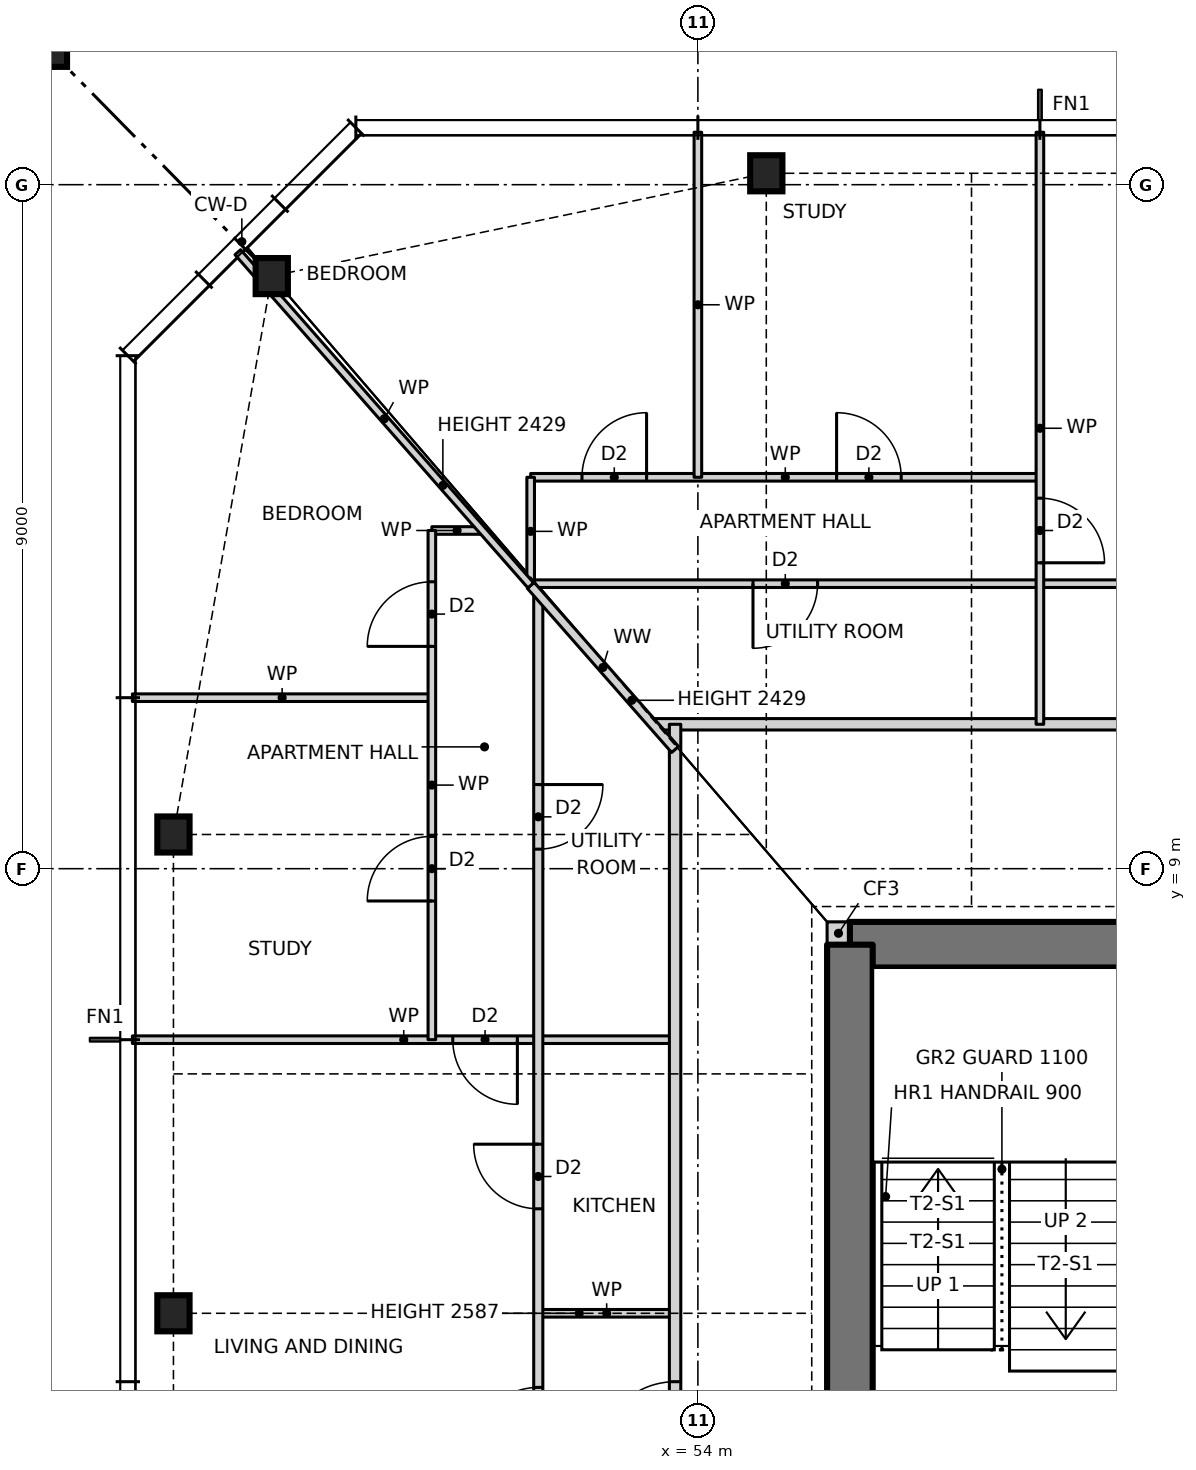
"""IFC4 building model, lengths in metres.
Left out: names, types, materials, properties, quantities, classifications, styles, units other than length and angle.
Written with IfcOpenShell. Run it as: python <this file> out.ifc"""

import sys

from ifc_helpers import new_model, si_unit, direction, frame, frame_2d, origin, origin_2d, place, context, subcontext, project, spatial, rectangle, hollow_rectangle, i_section, extrude, element, fill, save


model = new_model("IFC4")
c1 = context("Model", 3, precision=1e-05, world=origin(), true_north=direction((0.0, 1.0)))
c2 = subcontext(c1, "Body", "Model", "MODEL_VIEW")
j1 = project(units=[si_unit("LENGTHUNIT", "METRE"), si_unit("PLANEANGLEUNIT", "RADIAN")], contexts=[c1])
p1 = place(None, origin())
s1 = spatial("IfcSite", under=j1, at=p1, CompositionType="ELEMENT")
p2 = place(p1, origin())
s2 = spatial("IfcBuilding", under=s1, at=p2, CompositionType="ELEMENT")
p3 = place(p2, frame((0.0, 0.0, 43.0)))
s3 = spatial("IfcBuildingStorey", under=s2, at=p3, CompositionType="ELEMENT", Elevation=43.0)
for number, where, z_axis, x_axis in (
    (1, (54.9, 18.15, 0.0), (0.0, 0.0, 1.0), (1.0, 0.0, 0.0)),
    (2, (48.394, 16.797, 0.0), (0.0, 0.0, 1.0), (1.0, 0.0, 0.0)),
    (3, (47.1, 9.45, 0.0), (0.0, 0.0, 1.0), (1.0, 0.0, 0.0)),
    (4, (47.1, 3.15, 0.0), (0.0, 0.0, 1.0), (1.0, 0.0, 0.0)),
):
    element("IfcColumn", number, at=place(p3, frame(where, z_axis=z_axis, x_axis=x_axis)), inside=s3, PredefinedType="COLUMN", context=c2, shape_type="SweptSolid", body=[
        extrude(i_section(OverallWidth=0.424, OverallDepth=0.475, WebThickness=0.048, FlangeThickness=0.077, at=origin_2d()), origin(), (0.0, 0.0, 1.0), 3.5),
    ])
p4 = place(p3, frame((45.1, 20.15, 0.0), z_axis=(0.0, 0.0, 1.0), x_axis=(1.0, 0.0, 0.0)))
e5 = element("IfcColumn", 5, at=p4, inside=s3, PredefinedType="COLUMN", context=c2, shape_type="SweptSolid", body=[
    extrude(hollow_rectangle(XDim=1.2, YDim=1.2, WallThickness=0.07, at=origin_2d()), origin(), (0.0, 0.0, 1.0), 3.5),
])
p5 = place(p3, frame((55.7, 8.15, 0.0), z_axis=(0.0, 0.0, 1.0), x_axis=(1.0, 0.0, 0.0)))
e6 = element("IfcWall", 6, at=p5, inside=s3, PredefinedType="SOLIDWALL", context=c2, shape_type="SweptSolid", body=[
    extrude(rectangle(XDim=0.3, YDim=0.3, at=frame_2d((0.15, 0.0))), origin(), (0.0, 0.0, 1.0), 3.5),
])
p6 = place(p3, frame((70.0, 8.0, 0.0), z_axis=(0.0, 0.0, 1.0), x_axis=(-1.0, 0.0, 0.0)))
e7 = element("IfcWall", 7, at=p6, inside=s3, PredefinedType="SHEAR", context=c2, shape_type="SweptSolid", body=[
    extrude(rectangle(XDim=14.0, YDim=0.6, at=frame_2d((7.0, 0.0))), origin(), (0.0, 0.0, 1.0), 3.5),
])
p7 = place(p6, frame((8.2, 0.0, 0.0)))
e8 = element("IfcOpeningElement", 8, at=p7, cuts=e7, PredefinedType="OPENING", context=c2, shape_type="SweptSolid", body=[
    extrude(rectangle(XDim=0.9, YDim=2.1, at=frame_2d((0.45, 1.05))), frame((0.0, 0.31, 0.0), z_axis=(0.0, -1.0, 0.0), x_axis=(1.0, 0.0, 0.0)), (0.0, 0.0, 1.0), 0.62),
])
p8 = place(p6, frame((3.2, 0.0, 0.0)))
e9 = element("IfcOpeningElement", 9, at=p8, cuts=e7, PredefinedType="OPENING", context=c2, shape_type="SweptSolid", body=[
    extrude(rectangle(XDim=0.9, YDim=2.1, at=frame_2d((0.45, 1.05))), frame((0.0, 0.31, 0.0), z_axis=(0.0, -1.0, 0.0), x_axis=(1.0, 0.0, 0.0)), (0.0, 0.0, 1.0), 0.62),
])
p9 = place(p3, frame((56.0, 8.0, 0.0), z_axis=(0.0, 0.0, 1.0), x_axis=(0.0, -1.0, 0.0)))
e10 = element("IfcWall", 10, at=p9, inside=s3, PredefinedType="SHEAR", context=c2, shape_type="SweptSolid", body=[
    extrude(rectangle(XDim=16.0, YDim=0.6, at=frame_2d((8.0, 0.0))), origin(), (0.0, 0.0, 1.0), 3.5),
])
p10 = place(p9, frame((7.5, 0.0, 0.0)))
e11 = element("IfcOpeningElement", 11, at=p10, cuts=e10, PredefinedType="OPENING", context=c2, shape_type="SweptSolid", body=[
    extrude(rectangle(XDim=1.0, YDim=2.1, at=frame_2d((0.5, 1.05))), frame((0.0, 0.31, 0.0), z_axis=(0.0, -1.0, 0.0), x_axis=(1.0, 0.0, 0.0)), (0.0, 0.0, 1.0), 0.62),
])
p11 = place(p3, frame((51.9, 3.15, 0.0), z_axis=(0.0, 0.0, 1.0), x_axis=(1.0, 0.0, 0.0)))
e12 = element("IfcWall", 12, at=p11, inside=s3, PredefinedType="PARTITIONING", context=c2, shape_type="SweptSolid", body=[
    extrude(rectangle(XDim=1.8, YDim=0.1, at=frame_2d((0.9, 0.0))), origin(), (0.0, 0.0, 1.0), 2.587),
])
p12 = place(p3, frame((46.56, 6.75, 0.0), z_axis=(0.0, 0.0, 1.0), x_axis=(1.0, 0.0, 0.0)))
e13 = element("IfcWall", 13, at=p12, inside=s3, PredefinedType="PARTITIONING", context=c2, shape_type="SweptSolid", body=[
    extrude(rectangle(XDim=7.14, YDim=0.1, at=frame_2d((3.57, 0.0))), origin(), (0.0, 0.0, 1.0), 3.27),
])
p13 = place(p12, frame((4.215, 0.0, 0.0)))
e14 = element("IfcOpeningElement", 14, at=p13, cuts=e13, PredefinedType="OPENING", context=c2, shape_type="SweptSolid", body=[
    extrude(rectangle(XDim=0.85, YDim=2.1, at=frame_2d((0.425, 1.05))), frame((0.0, 0.06, 0.0), z_axis=(0.0, -1.0, 0.0), x_axis=(1.0, 0.0, 0.0)), (0.0, 0.0, 1.0), 0.12),
])
p14 = place(p3, frame((53.408, 10.9, 0.0), z_axis=(0.0, 0.0, 1.0), x_axis=(1.0, 0.0, 0.0)))
e15 = element("IfcWall", 15, at=p14, inside=s3, PredefinedType="PARTITIONING", context=c2, shape_type="SweptSolid", body=[
    extrude(rectangle(XDim=19.184, YDim=0.15, at=frame_2d((9.592, 0.0))), origin(), (0.0, 0.0, 1.0), 3.27),
])
p15 = place(p14, frame((8.592, 0.0, 0.0)))
e16 = element("IfcOpeningElement", 16, at=p15, cuts=e15, PredefinedType="OPENING", context=c2, shape_type="SweptSolid", body=[
    extrude(rectangle(XDim=1.0, YDim=2.1, at=frame_2d((0.5, 1.05))), frame((0.0, 0.085, 0.0), z_axis=(0.0, -1.0, 0.0), x_axis=(1.0, 0.0, 0.0)), (0.0, 0.0, 1.0), 0.17),
])
p16 = place(p3, frame((46.56, 11.25, 0.0), z_axis=(0.0, 0.0, 1.0), x_axis=(1.0, 0.0, 0.0)))
e17 = element("IfcWall", 17, at=p16, inside=s3, PredefinedType="PARTITIONING", context=c2, shape_type="SweptSolid", body=[
    extrude(rectangle(XDim=3.94, YDim=0.1, at=frame_2d((1.97, 0.0))), origin(), (0.0, 0.0, 1.0), 3.27),
])
p17 = place(p3, frame((51.8, 12.75, 0.0), z_axis=(0.0, 0.0, 1.0), x_axis=(1.0, 0.0, 0.0)))
e18 = element("IfcWall", 18, at=p17, inside=s3, PredefinedType="PARTITIONING", context=c2, shape_type="SweptSolid", body=[
    extrude(rectangle(XDim=22.4, YDim=0.1, at=frame_2d((11.2, 0.0))), origin(), (0.0, 0.0, 1.0), 3.27),
])
p18 = place(p17, frame((13.475, 0.0, 0.0)))
e19 = element("IfcOpeningElement", 19, at=p18, cuts=e18, PredefinedType="OPENING", context=c2, shape_type="SweptSolid", body=[
    extrude(rectangle(XDim=0.85, YDim=2.1, at=frame_2d((0.425, 1.05))), frame((0.0, 0.06, 0.0), z_axis=(0.0, -1.0, 0.0), x_axis=(1.0, 0.0, 0.0)), (0.0, 0.0, 1.0), 0.12),
])
p19 = place(p17, frame((10.275, 0.0, 0.0)))
e20 = element("IfcOpeningElement", 20, at=p19, cuts=e18, PredefinedType="OPENING", context=c2, shape_type="SweptSolid", body=[
    extrude(rectangle(XDim=0.85, YDim=2.1, at=frame_2d((0.425, 1.05))), frame((0.0, 0.06, 0.0), z_axis=(0.0, -1.0, 0.0), x_axis=(1.0, 0.0, 0.0)), (0.0, 0.0, 1.0), 0.12),
])
p20 = place(p17, frame((18.625, 0.0, 0.0)))
e21 = element("IfcOpeningElement", 21, at=p20, cuts=e18, PredefinedType="OPENING", context=c2, shape_type="SweptSolid", body=[
    extrude(rectangle(XDim=0.85, YDim=2.1, at=frame_2d((0.425, 1.05))), frame((0.0, 0.06, 0.0), z_axis=(0.0, -1.0, 0.0), x_axis=(1.0, 0.0, 0.0)), (0.0, 0.0, 1.0), 0.12),
])
p21 = place(p17, frame((2.925, 0.0, 0.0)))
e22 = element("IfcOpeningElement", 22, at=p21, cuts=e18, PredefinedType="OPENING", context=c2, shape_type="SweptSolid", body=[
    extrude(rectangle(XDim=0.85, YDim=2.1, at=frame_2d((0.425, 1.05))), frame((0.0, 0.06, 0.0), z_axis=(0.0, -1.0, 0.0), x_axis=(1.0, 0.0, 0.0)), (0.0, 0.0, 1.0), 0.12),
])
p22 = place(p3, frame((50.5, 13.45, 0.0), z_axis=(0.0, 0.0, 1.0), x_axis=(1.0, 0.0, 0.0)))
e23 = element("IfcWall", 23, at=p22, inside=s3, PredefinedType="PARTITIONING", context=c2, shape_type="SweptSolid", body=[
    extrude(rectangle(XDim=0.664, YDim=0.1, at=frame_2d((0.332, 0.0))), origin(), (0.0, 0.0, 1.0), 3.27),
])
p23 = place(p3, frame((51.8, 14.15, 0.0), z_axis=(0.0, 0.0, 1.0), x_axis=(1.0, 0.0, 0.0)))
e24 = element("IfcWall", 24, at=p23, inside=s3, PredefinedType="PARTITIONING", context=c2, shape_type="SweptSolid", body=[
    extrude(rectangle(XDim=6.7, YDim=0.1, at=frame_2d((3.35, 0.0))), origin(), (0.0, 0.0, 1.0), 3.27),
])
p24 = place(p23, frame((4.025, 0.0, 0.0)))
e25 = element("IfcOpeningElement", 25, at=p24, cuts=e24, PredefinedType="OPENING", context=c2, shape_type="SweptSolid", body=[
    extrude(rectangle(XDim=0.85, YDim=2.1, at=frame_2d((0.425, 1.05))), frame((0.0, 0.06, 0.0), z_axis=(0.0, -1.0, 0.0), x_axis=(1.0, 0.0, 0.0)), (0.0, 0.0, 1.0), 0.12),
])
p25 = place(p23, frame((0.675, 0.0, 0.0)))
e26 = element("IfcOpeningElement", 26, at=p25, cuts=e24, PredefinedType="OPENING", context=c2, shape_type="SweptSolid", body=[
    extrude(rectangle(XDim=0.85, YDim=2.1, at=frame_2d((0.425, 1.05))), frame((0.0, 0.06, 0.0), z_axis=(0.0, -1.0, 0.0), x_axis=(1.0, 0.0, 0.0)), (0.0, 0.0, 1.0), 0.12),
])
p26 = place(p3, frame((58.5, 10.9, 0.0), z_axis=(0.0, 0.0, 1.0), x_axis=(0.0, 1.0, 0.0)))
e27 = element("IfcWall", 27, at=p26, inside=s3, PredefinedType="PARTITIONING", context=c2, shape_type="SweptSolid", body=[
    extrude(rectangle(XDim=7.79, YDim=0.1, at=frame_2d((3.895, 0.0))), origin(), (0.0, 0.0, 1.0), 3.27),
])
p27 = place(p26, frame((2.125, 0.0, 0.0)))
e28 = element("IfcOpeningElement", 28, at=p27, cuts=e27, PredefinedType="OPENING", context=c2, shape_type="SweptSolid", body=[
    extrude(rectangle(XDim=0.85, YDim=2.1, at=frame_2d((0.425, 1.05))), frame((0.0, 0.06, 0.0), z_axis=(0.0, -1.0, 0.0), x_axis=(1.0, 0.0, 0.0)), (0.0, 0.0, 1.0), 0.12),
])
p28 = place(p3, frame((54.0, 14.15, 0.0), z_axis=(0.0, 0.0, 1.0), x_axis=(0.0, 1.0, 0.0)))
e29 = element("IfcWall", 29, at=p28, inside=s3, PredefinedType="PARTITIONING", context=c2, shape_type="SweptSolid", body=[
    extrude(rectangle(XDim=4.54, YDim=0.1, at=frame_2d((2.27, 0.0))), origin(), (0.0, 0.0, 1.0), 3.27),
])
p29 = place(p3, frame((53.7, -10.568, 0.0), z_axis=(0.0, 0.0, 1.0), x_axis=(0.0, 1.0, 0.0)))
e30 = element("IfcWall", 30, at=p29, inside=s3, PredefinedType="PARTITIONING", context=c2, shape_type="SweptSolid", body=[
    extrude(rectangle(XDim=21.468, YDim=0.15, at=frame_2d((10.734, 0.0))), origin(), (0.0, 0.0, 1.0), 3.27),
])
p30 = place(p29, frame((11.818, 0.0, 0.0)))
e31 = element("IfcOpeningElement", 31, at=p30, cuts=e30, PredefinedType="OPENING", context=c2, shape_type="SweptSolid", body=[
    extrude(rectangle(XDim=1.0, YDim=2.1, at=frame_2d((0.5, 1.05))), frame((0.0, 0.085, 0.0), z_axis=(0.0, -1.0, 0.0), x_axis=(1.0, 0.0, 0.0)), (0.0, 0.0, 1.0), 0.17),
])
p31 = place(p3, frame((51.9, -12.614, 0.0), z_axis=(0.0, 0.0, 1.0), x_axis=(0.0, 1.0, 0.0)))
e32 = element("IfcWall", 32, at=p31, inside=s3, PredefinedType="PARTITIONING", context=c2, shape_type="SweptSolid", body=[
    extrude(rectangle(XDim=25.228, YDim=0.12, at=frame_2d((12.614, 0.0))), origin(), (0.0, 0.0, 1.0), 3.27),
])
p32 = place(p31, frame((17.139, 0.0, 0.0)))
e33 = element("IfcOpeningElement", 33, at=p32, cuts=e32, PredefinedType="OPENING", context=c2, shape_type="SweptSolid", body=[
    extrude(rectangle(XDim=0.85, YDim=2.1, at=frame_2d((0.425, 1.05))), frame((0.0, 0.07, 0.0), z_axis=(0.0, -1.0, 0.0), x_axis=(1.0, 0.0, 0.0)), (0.0, 0.0, 1.0), 0.14),
])
p33 = place(p31, frame((13.939, 0.0, 0.0)))
e34 = element("IfcOpeningElement", 34, at=p33, cuts=e32, PredefinedType="OPENING", context=c2, shape_type="SweptSolid", body=[
    extrude(rectangle(XDim=0.85, YDim=2.1, at=frame_2d((0.425, 1.05))), frame((0.0, 0.07, 0.0), z_axis=(0.0, -1.0, 0.0), x_axis=(1.0, 0.0, 0.0)), (0.0, 0.0, 1.0), 0.14),
])
p34 = place(p31, frame((21.871, 0.0, 0.0)))
e35 = element("IfcOpeningElement", 35, at=p34, cuts=e32, PredefinedType="OPENING", context=c2, shape_type="SweptSolid", body=[
    extrude(rectangle(XDim=0.85, YDim=2.1, at=frame_2d((0.425, 1.05))), frame((0.0, 0.07, 0.0), z_axis=(0.0, -1.0, 0.0), x_axis=(1.0, 0.0, 0.0)), (0.0, 0.0, 1.0), 0.14),
])
p35 = place(p31, frame((7.739, 0.0, 0.0)))
e36 = element("IfcOpeningElement", 36, at=p35, cuts=e32, PredefinedType="OPENING", context=c2, shape_type="SweptSolid", body=[
    extrude(rectangle(XDim=0.85, YDim=2.1, at=frame_2d((0.425, 1.05))), frame((0.0, 0.07, 0.0), z_axis=(0.0, -1.0, 0.0), x_axis=(1.0, 0.0, 0.0)), (0.0, 0.0, 1.0), 0.14),
])
p36 = place(p31, frame((2.557, 0.0, 0.0)))
e37 = element("IfcOpeningElement", 37, at=p36, cuts=e32, PredefinedType="OPENING", context=c2, shape_type="SweptSolid", body=[
    extrude(rectangle(XDim=0.85, YDim=2.1, at=frame_2d((0.425, 1.05))), frame((0.0, 0.07, 0.0), z_axis=(0.0, -1.0, 0.0), x_axis=(1.0, 0.0, 0.0)), (0.0, 0.0, 1.0), 0.14),
])
p37 = place(p3, frame((51.8, 12.727, 0.0), z_axis=(0.0, 0.0, 1.0), x_axis=(0.0, 1.0, 0.0)))
e38 = element("IfcWall", 38, at=p37, inside=s3, PredefinedType="PARTITIONING", context=c2, shape_type="SweptSolid", body=[
    extrude(rectangle(XDim=1.423, YDim=0.1, at=frame_2d((0.711, 0.0))), origin(), (0.0, 0.0, 1.0), 3.27),
])
p38 = place(p3, frame((50.5, 6.75, 0.0), z_axis=(0.0, 0.0, 1.0), x_axis=(0.0, 1.0, 0.0)))
e39 = element("IfcWall", 39, at=p38, inside=s3, PredefinedType="PARTITIONING", context=c2, shape_type="SweptSolid", body=[
    extrude(rectangle(XDim=6.7, YDim=0.1, at=frame_2d((3.35, 0.0))), origin(), (0.0, 0.0, 1.0), 3.27),
])
p39 = place(p38, frame((1.825, 0.0, 0.0)))
e40 = element("IfcOpeningElement", 40, at=p39, cuts=e39, PredefinedType="OPENING", context=c2, shape_type="SweptSolid", body=[
    extrude(rectangle(XDim=0.85, YDim=2.1, at=frame_2d((0.425, 1.05))), frame((0.0, 0.06, 0.0), z_axis=(0.0, -1.0, 0.0), x_axis=(1.0, 0.0, 0.0)), (0.0, 0.0, 1.0), 0.12),
])
p40 = place(p38, frame((5.175, 0.0, 0.0)))
e41 = element("IfcOpeningElement", 41, at=p40, cuts=e39, PredefinedType="OPENING", context=c2, shape_type="SweptSolid", body=[
    extrude(rectangle(XDim=0.85, YDim=2.1, at=frame_2d((0.425, 1.05))), frame((0.0, 0.06, 0.0), z_axis=(0.0, -1.0, 0.0), x_axis=(1.0, 0.0, 0.0)), (0.0, 0.0, 1.0), 0.12),
])
p41 = place(p3, frame((53.7, 10.568, 0.0), z_axis=(0.0, 0.0, 1.0), x_axis=(-0.660275707921, 0.751023294931, 0.0)))
e42 = element("IfcWall", 42, at=p41, inside=s3, PredefinedType="PARTITIONING", context=c2, shape_type="SweptSolid", body=[
    extrude(rectangle(XDim=2.876, YDim=0.12, at=frame_2d((1.438, 0.0))), origin(), (0.0, 0.0, 1.0), 2.429),
])
p42 = place(p3, frame((51.801, 12.728, 0.0), z_axis=(0.0, 0.0, 1.0), x_axis=(-0.660267638736, 0.751030389024, 0.0)))
e43 = element("IfcWall", 43, at=p42, inside=s3, PredefinedType="PARTITIONING", context=c2, shape_type="SweptSolid", body=[
    extrude(rectangle(XDim=5.837, YDim=0.1, at=frame_2d((2.918, 0.0))), origin(), (0.0, 0.0, 1.0), 2.429),
])
p43 = place(p27, frame((0.85, 0.0, 0.0), z_axis=(0.0, 0.0, 1.0), x_axis=(-1.0, 0.0, 0.0)))
e44 = element("IfcDoor", 44, at=p43, inside=s3, OperationType="SINGLE_SWING_RIGHT", PredefinedType="DOOR", context=c2, shape_type="SweptSolid", body=[
    extrude(rectangle(XDim=0.85, YDim=2.1, at=frame_2d((0.425, 1.05))), frame((0.0, 0.025, 0.0), z_axis=(0.0, -1.0, 0.0), x_axis=(1.0, 0.0, 0.0)), (0.0, 0.0, 1.0), 0.05),
])
fill(e28, e44)
p44 = place(p24, origin())
e45 = element("IfcDoor", 45, at=p44, inside=s3, OperationType="SINGLE_SWING_LEFT", PredefinedType="DOOR", context=c2, shape_type="SweptSolid", body=[
    extrude(rectangle(XDim=0.85, YDim=2.1, at=frame_2d((0.425, 1.05))), frame((0.0, 0.025, 0.0), z_axis=(0.0, -1.0, 0.0), x_axis=(1.0, 0.0, 0.0)), (0.0, 0.0, 1.0), 0.05),
])
fill(e25, e45)
p45 = place(p25, origin())
e46 = element("IfcDoor", 46, at=p45, inside=s3, OperationType="SINGLE_SWING_RIGHT", PredefinedType="DOOR", context=c2, shape_type="SweptSolid", body=[
    extrude(rectangle(XDim=0.85, YDim=2.1, at=frame_2d((0.425, 1.05))), frame((0.0, 0.025, 0.0), z_axis=(0.0, -1.0, 0.0), x_axis=(1.0, 0.0, 0.0)), (0.0, 0.0, 1.0), 0.05),
])
fill(e26, e46)
p46 = place(p21, frame((0.85, 0.0, 0.0), z_axis=(0.0, 0.0, 1.0), x_axis=(-1.0, 0.0, 0.0)))
e47 = element("IfcDoor", 47, at=p46, inside=s3, OperationType="SINGLE_SWING_RIGHT", PredefinedType="DOOR", context=c2, shape_type="SweptSolid", body=[
    extrude(rectangle(XDim=0.85, YDim=2.1, at=frame_2d((0.425, 1.05))), frame((0.0, 0.025, 0.0), z_axis=(0.0, -1.0, 0.0), x_axis=(1.0, 0.0, 0.0)), (0.0, 0.0, 1.0), 0.05),
])
fill(e22, e47)
p47 = place(p32, origin())
e48 = element("IfcDoor", 48, at=p47, inside=s3, OperationType="SINGLE_SWING_RIGHT", PredefinedType="DOOR", context=c2, shape_type="SweptSolid", body=[
    extrude(rectangle(XDim=0.85, YDim=2.1, at=frame_2d((0.425, 1.05))), frame((0.0, 0.025, 0.0), z_axis=(0.0, -1.0, 0.0), x_axis=(1.0, 0.0, 0.0)), (0.0, 0.0, 1.0), 0.05),
])
fill(e33, e48)
p48 = place(p30, origin())
e49 = element("IfcDoor", 49, at=p48, inside=s3, OperationType="SINGLE_SWING_LEFT", PredefinedType="DOOR", context=c2, shape_type="SweptSolid", body=[
    extrude(rectangle(XDim=1.0, YDim=2.1, at=frame_2d((0.5, 1.05))), frame((0.0, 0.025, 0.0), z_axis=(0.0, -1.0, 0.0), x_axis=(1.0, 0.0, 0.0)), (0.0, 0.0, 1.0), 0.05),
])
fill(e31, e49)
p49 = place(p33, origin())
e50 = element("IfcDoor", 50, at=p49, inside=s3, OperationType="SINGLE_SWING_LEFT", PredefinedType="DOOR", context=c2, shape_type="SweptSolid", body=[
    extrude(rectangle(XDim=0.85, YDim=2.1, at=frame_2d((0.425, 1.05))), frame((0.0, 0.025, 0.0), z_axis=(0.0, -1.0, 0.0), x_axis=(1.0, 0.0, 0.0)), (0.0, 0.0, 1.0), 0.05),
])
fill(e34, e50)
p50 = place(p13, frame((0.85, 0.0, 0.0), z_axis=(0.0, 0.0, 1.0), x_axis=(-1.0, 0.0, 0.0)))
e51 = element("IfcDoor", 51, at=p50, inside=s3, OperationType="SINGLE_SWING_LEFT", PredefinedType="DOOR", context=c2, shape_type="SweptSolid", body=[
    extrude(rectangle(XDim=0.85, YDim=2.1, at=frame_2d((0.425, 1.05))), frame((0.0, 0.025, 0.0), z_axis=(0.0, -1.0, 0.0), x_axis=(1.0, 0.0, 0.0)), (0.0, 0.0, 1.0), 0.05),
])
fill(e14, e51)
p51 = place(p39, origin())
e52 = element("IfcDoor", 52, at=p51, inside=s3, OperationType="SINGLE_SWING_LEFT", PredefinedType="DOOR", context=c2, shape_type="SweptSolid", body=[
    extrude(rectangle(XDim=0.85, YDim=2.1, at=frame_2d((0.425, 1.05))), frame((0.0, 0.025, 0.0), z_axis=(0.0, -1.0, 0.0), x_axis=(1.0, 0.0, 0.0)), (0.0, 0.0, 1.0), 0.05),
])
fill(e40, e52)
p52 = place(p40, origin())
e53 = element("IfcDoor", 53, at=p52, inside=s3, OperationType="SINGLE_SWING_LEFT", PredefinedType="DOOR", context=c2, shape_type="SweptSolid", body=[
    extrude(rectangle(XDim=0.85, YDim=2.1, at=frame_2d((0.425, 1.05))), frame((0.0, 0.025, 0.0), z_axis=(0.0, -1.0, 0.0), x_axis=(1.0, 0.0, 0.0)), (0.0, 0.0, 1.0), 0.05),
])
fill(e41, e53)
p53 = place(p34, frame((0.85, 0.0, 0.0), z_axis=(0.0, 0.0, 1.0), x_axis=(-1.0, 0.0, 0.0)))
e54 = element("IfcDoor", 54, at=p53, inside=s3, OperationType="SINGLE_SWING_LEFT", PredefinedType="DOOR", context=c2, shape_type="SweptSolid", body=[
    extrude(rectangle(XDim=0.85, YDim=2.1, at=frame_2d((0.425, 1.05))), frame((0.0, 0.025, 0.0), z_axis=(0.0, -1.0, 0.0), x_axis=(1.0, 0.0, 0.0)), (0.0, 0.0, 1.0), 0.05),
])
fill(e35, e54)
save(model, sys.argv[1])
